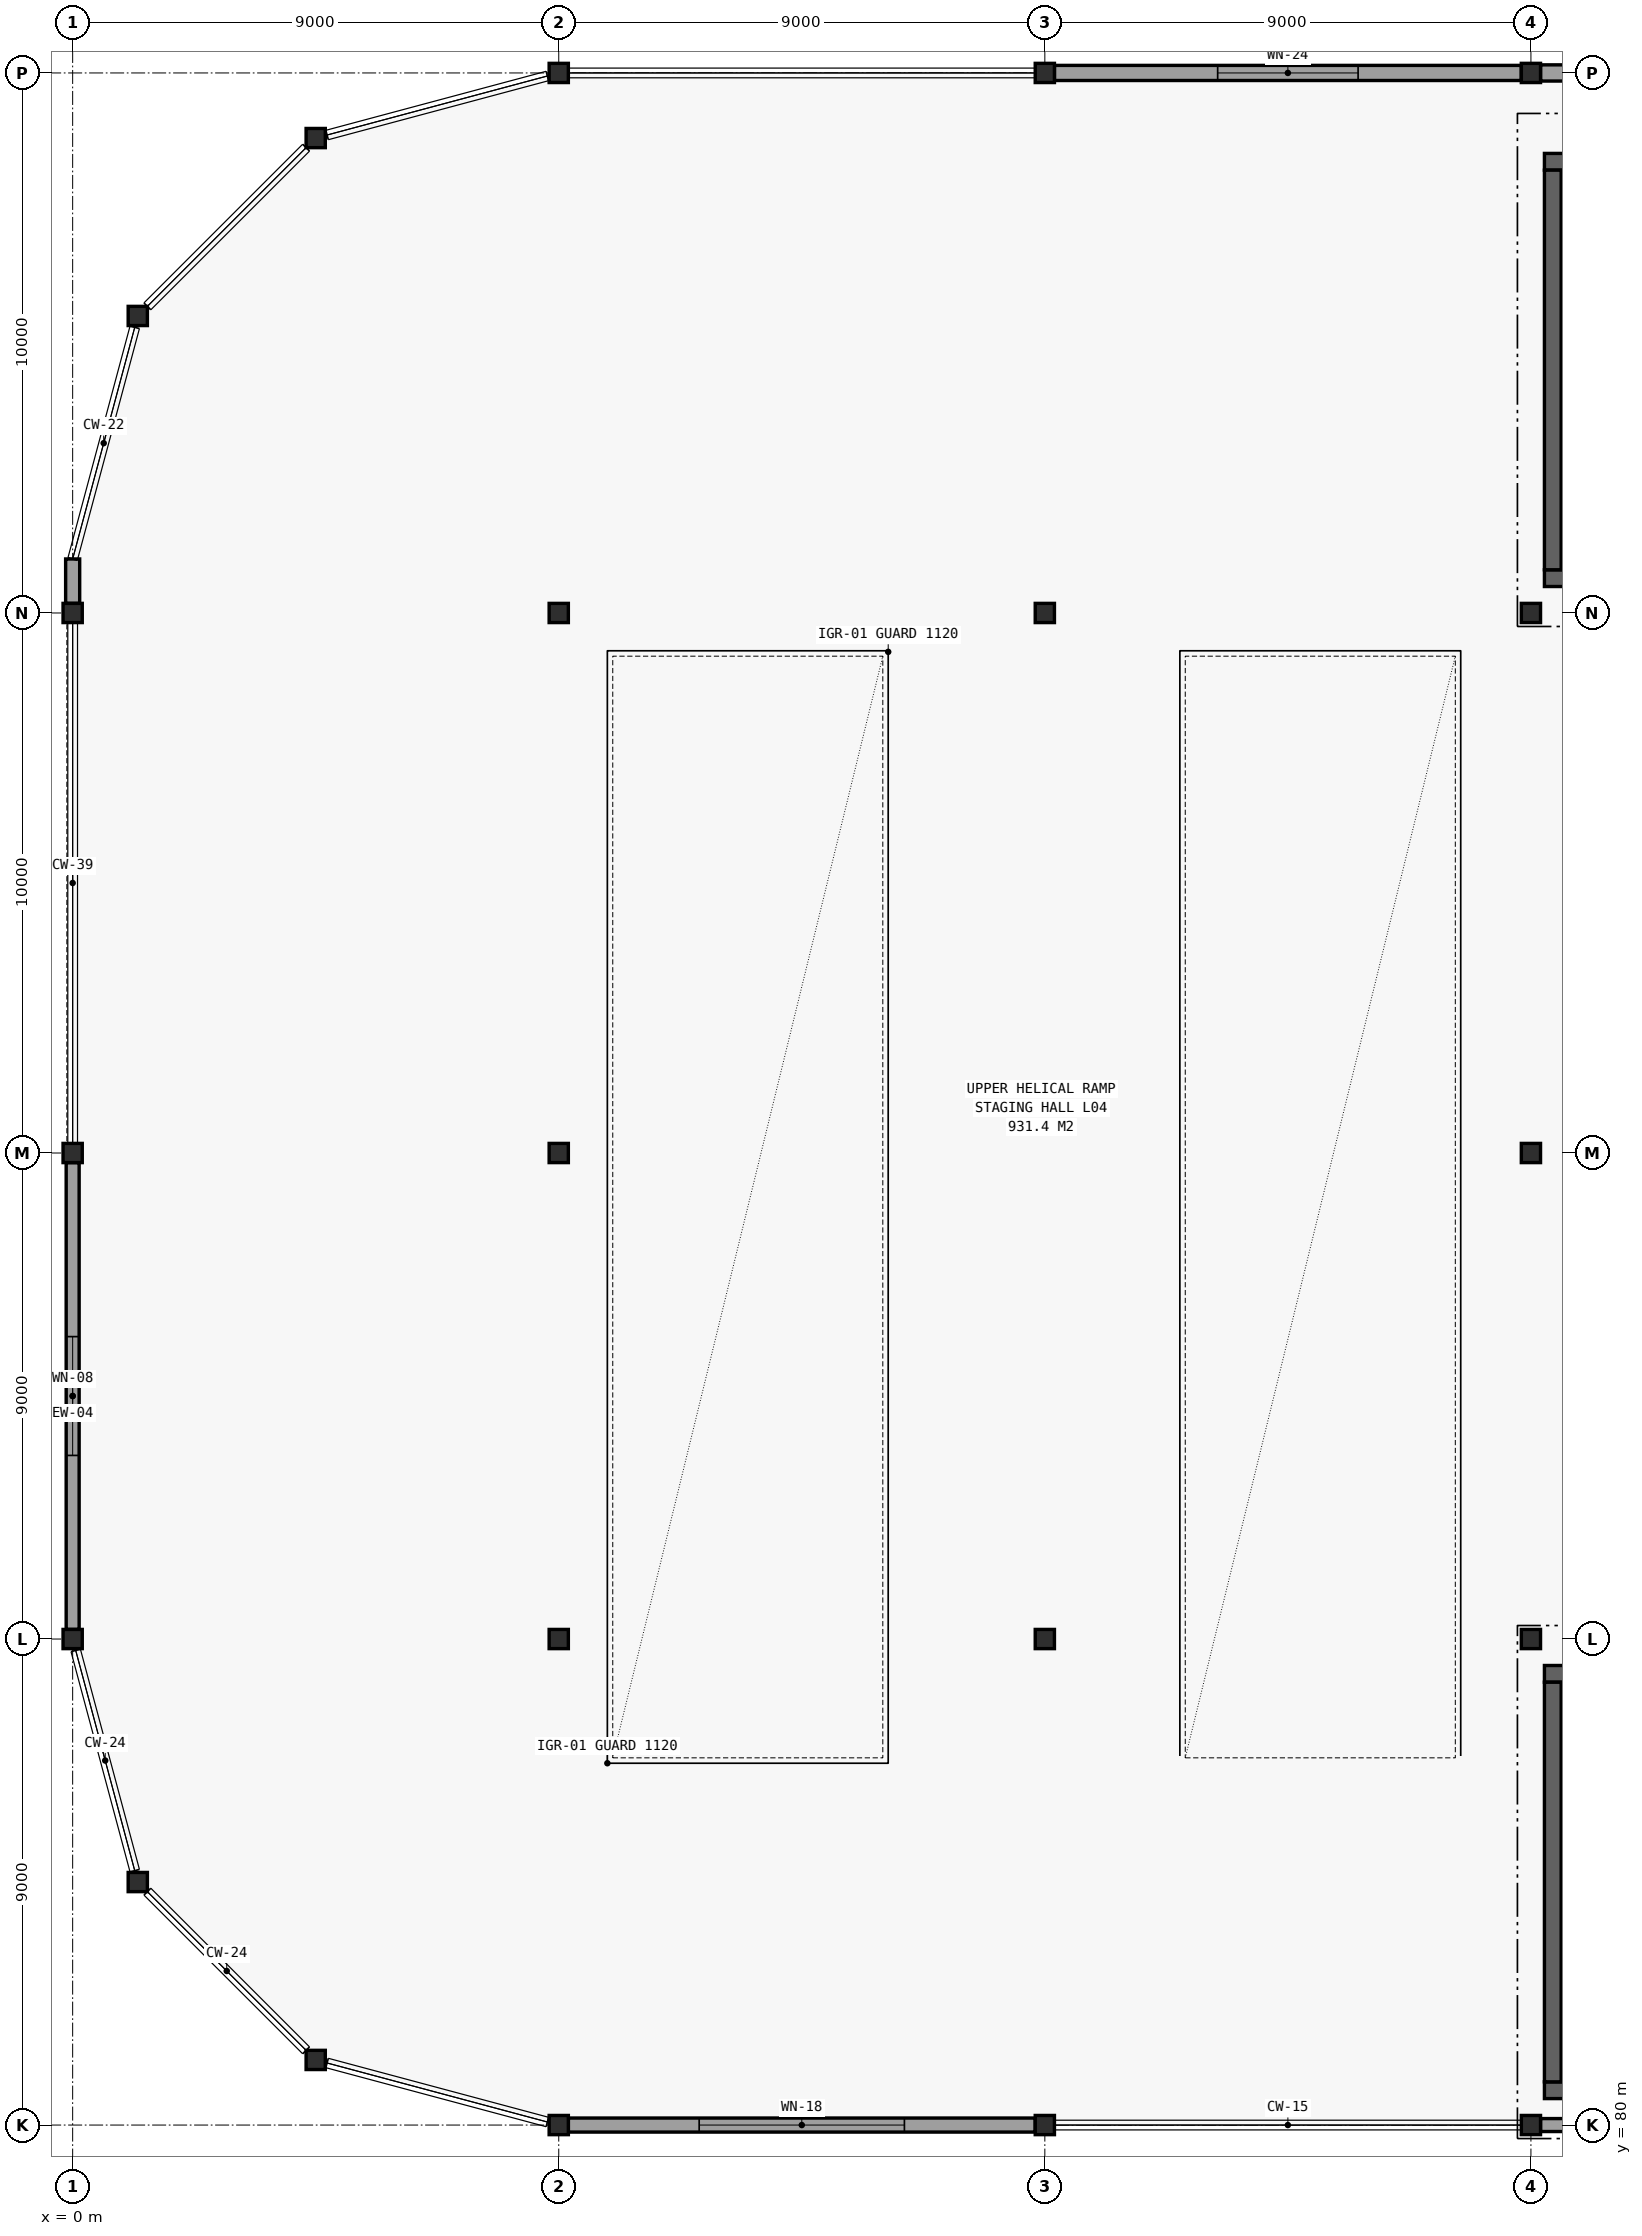
"""IFC4 building model, lengths in metres.
Left out: names, types, materials, properties, quantities, classifications, styles, units other than length and angle.
Written with IfcOpenShell. Run it as: python <this file> out.ifc"""

import sys

from ifc_helpers import new_model, si_unit, direction, frame, frame_2d, origin, origin_2d, place, context, subcontext, project, spatial, rectangle, hollow_circle, extrude, element, fill, save


model = new_model("IFC4")
c1 = context("Model", 3, precision=1e-05, world=origin(), true_north=direction((0.0, 1.0)))
c2 = subcontext(c1, "Body", "Model", "MODEL_VIEW")
j1 = project(units=[si_unit("LENGTHUNIT", "METRE"), si_unit("PLANEANGLEUNIT", "RADIAN")], contexts=[c1])
p1 = place(None, origin())
s1 = spatial("IfcSite", under=j1, at=p1, CompositionType="ELEMENT")
p2 = place(p1, origin())
s2 = spatial("IfcBuilding", under=s1, at=p2, CompositionType="ELEMENT")
p3 = place(p2, frame((0.0, 0.0, 17.7)))
s3 = spatial("IfcBuildingStorey", under=s2, at=p3, CompositionType="ELEMENT", Elevation=17.7)
for number, where, z_axis, x_axis in (
    (1, (0.0, 89.0, 0.0), (0.0, 0.0, 1.0), (1.0, 0.0, 0.0)),
    (2, (0.0, 98.0, 0.0), (0.0, 0.0, 1.0), (1.0, 0.0, 0.0)),
    (3, (0.0, 108.0, 0.0), (0.0, 0.0, 1.0), (1.0, 0.0, 0.0)),
    (4, (1.206, 84.5, 0.0), (0.0, 0.0, 1.0), (1.0, 0.0, 0.0)),
    (5, (1.206, 113.5, 0.0), (0.0, 0.0, 1.0), (1.0, 0.0, 0.0)),
    (6, (4.5, 81.206, 0.0), (0.0, 0.0, 1.0), (1.0, 0.0, 0.0)),
    (7, (4.5, 116.794, 0.0), (0.0, 0.0, 1.0), (1.0, 0.0, 0.0)),
    (8, (9.0, 80.0, 0.0), (0.0, 0.0, 1.0), (1.0, 0.0, 0.0)),
    (9, (9.0, 89.0, 0.0), (0.0, 0.0, 1.0), (1.0, 0.0, 0.0)),
    (10, (9.0, 98.0, 0.0), (0.0, 0.0, 1.0), (1.0, 0.0, 0.0)),
    (11, (9.0, 108.0, 0.0), (0.0, 0.0, 1.0), (1.0, 0.0, 0.0)),
    (12, (9.0, 118.0, 0.0), (0.0, 0.0, 1.0), (1.0, 0.0, 0.0)),
    (13, (18.0, 80.0, 0.0), (0.0, 0.0, 1.0), (1.0, 0.0, 0.0)),
    (14, (18.0, 89.0, 0.0), (0.0, 0.0, 1.0), (1.0, 0.0, 0.0)),
    (15, (18.0, 108.0, 0.0), (0.0, 0.0, 1.0), (1.0, 0.0, 0.0)),
    (16, (18.0, 118.0, 0.0), (0.0, 0.0, 1.0), (1.0, 0.0, 0.0)),
    (17, (27.0, 80.0, 0.0), (0.0, 0.0, 1.0), (1.0, 0.0, 0.0)),
    (18, (27.0, 89.0, 0.0), (0.0, 0.0, 1.0), (1.0, 0.0, 0.0)),
    (19, (27.0, 98.0, 0.0), (0.0, 0.0, 1.0), (1.0, 0.0, 0.0)),
    (20, (27.0, 108.0, 0.0), (0.0, 0.0, 1.0), (1.0, 0.0, 0.0)),
    (21, (27.0, 118.0, 0.0), (0.0, 0.0, 1.0), (1.0, 0.0, 0.0)),
):
    element("IfcColumn", number, at=place(p3, frame(where, z_axis=z_axis, x_axis=x_axis)), inside=s3, PredefinedType="COLUMN", context=c2, shape_type="SweptSolid", body=[
        extrude(hollow_circle(Radius=0.178, WallThickness=0.013, at=origin_2d()), origin(), (0.0, 0.0, 1.0), 4.14),
    ])
p4 = place(p3, frame((9.178, 80.0, 0.0), z_axis=(0.0, 0.0, 1.0), x_axis=(1.0, 0.0, 0.0)))
e22 = element("IfcWall", 22, at=p4, inside=s3, PredefinedType="SOLIDWALL", context=c2, shape_type="SweptSolid", body=[
    extrude(rectangle(XDim=8.645, YDim=0.26, at=frame_2d((4.322, 0.0))), origin(), (0.0, 0.0, 1.0), 3.526),
])
p5 = place(p4, frame((2.422, 0.0, 0.95)))
e23 = element("IfcOpeningElement", 23, at=p5, cuts=e22, PredefinedType="OPENING", context=c2, shape_type="SweptSolid", body=[
    extrude(rectangle(XDim=3.8, YDim=2.1, at=frame_2d((1.9, 1.05))), frame((0.0, 0.141, 0.0), z_axis=(0.0, -1.0, 0.0), x_axis=(1.0, 0.0, 0.0)), (0.0, 0.0, 1.0), 0.282),
])
p6 = place(p3, frame((27.178, 80.0, 0.0), z_axis=(0.0, 0.0, 1.0), x_axis=(1.0, 0.0, 0.0)))
e24 = element("IfcWall", 24, at=p6, inside=s3, PredefinedType="SOLIDWALL", context=c2, shape_type="SweptSolid", body=[
    extrude(rectangle(XDim=8.645, YDim=0.24, at=frame_2d((4.322, 0.0))), origin(), (0.0, 0.0, 1.0), 3.526),
])
p7 = place(p6, frame((2.622, 0.0, 0.95)))
e25 = element("IfcOpeningElement", 25, at=p7, cuts=e24, PredefinedType="OPENING", context=c2, shape_type="SweptSolid", body=[
    extrude(rectangle(XDim=3.4, YDim=2.0, at=frame_2d((1.7, 1.0))), frame((0.0, 0.131, 0.0), z_axis=(0.0, -1.0, 0.0), x_axis=(1.0, 0.0, 0.0)), (0.0, 0.0, 1.0), 0.262),
])
p8 = place(p3, frame((35.822, 118.0, 0.0), z_axis=(0.0, 0.0, 1.0), x_axis=(-1.0, 0.0, 0.0)))
e26 = element("IfcWall", 26, at=p8, inside=s3, PredefinedType="SOLIDWALL", context=c2, shape_type="SweptSolid", body=[
    extrude(rectangle(XDim=8.645, YDim=0.3, at=frame_2d((4.322, 0.0))), origin(), (0.0, 0.0, 1.0), 3.352),
])
p9 = place(p8, frame((2.822, 0.0, 0.95)))
e27 = element("IfcOpeningElement", 27, at=p9, cuts=e26, PredefinedType="OPENING", context=c2, shape_type="SweptSolid", body=[
    extrude(rectangle(XDim=3.0, YDim=2.0, at=frame_2d((1.5, 1.0))), frame((0.0, 0.161, 0.0), z_axis=(0.0, -1.0, 0.0), x_axis=(1.0, 0.0, 0.0)), (0.0, 0.0, 1.0), 0.322),
])
p10 = place(p3, frame((26.822, 118.0, 0.0), z_axis=(0.0, 0.0, 1.0), x_axis=(-1.0, 0.0, 0.0)))
e28 = element("IfcWall", 28, at=p10, inside=s3, PredefinedType="SOLIDWALL", context=c2, shape_type="SweptSolid", body=[
    extrude(rectangle(XDim=8.645, YDim=0.28, at=frame_2d((4.322, 0.0))), origin(), (0.0, 0.0, 1.0), 3.526),
])
p11 = place(p10, frame((3.022, 0.0, 0.95)))
e29 = element("IfcOpeningElement", 29, at=p11, cuts=e28, PredefinedType="OPENING", context=c2, shape_type="SweptSolid", body=[
    extrude(rectangle(XDim=2.6, YDim=1.9, at=frame_2d((1.3, 0.95))), frame((0.0, 0.151, 0.0), z_axis=(0.0, -1.0, 0.0), x_axis=(1.0, 0.0, 0.0)), (0.0, 0.0, 1.0), 0.302),
])
p12 = place(p3, frame((0.0, 109.0, 0.0), z_axis=(0.0, 0.0, 1.0), x_axis=(0.0, -1.0, 0.0)))
e30 = element("IfcWall", 30, at=p12, inside=s3, PredefinedType="SOLIDWALL", context=c2, shape_type="SweptSolid", body=[
    extrude(rectangle(XDim=0.822, YDim=0.26, at=frame_2d((0.411, 0.0))), origin(), (0.0, 0.0, 1.0), 3.526),
])
p13 = place(p3, frame((0.0, 97.822, 0.0), z_axis=(0.0, 0.0, 1.0), x_axis=(0.0, -1.0, 0.0)))
e31 = element("IfcWall", 31, at=p13, inside=s3, PredefinedType="SOLIDWALL", context=c2, shape_type="SweptSolid", body=[
    extrude(rectangle(XDim=8.645, YDim=0.24, at=frame_2d((4.322, 0.0))), origin(), (0.0, 0.0, 1.0), 3.526),
])
p14 = place(p13, frame((3.222, 0.0, 0.95)))
e32 = element("IfcOpeningElement", 32, at=p14, cuts=e31, PredefinedType="OPENING", context=c2, shape_type="SweptSolid", body=[
    extrude(rectangle(XDim=2.2, YDim=1.8, at=frame_2d((1.1, 0.9))), frame((0.0, 0.131, 0.0), z_axis=(0.0, -1.0, 0.0), x_axis=(1.0, 0.0, 0.0)), (0.0, 0.0, 1.0), 0.262),
])
for number, where, z_axis, x_axis in (
    (33, (27.25, 80.645, 0.0), (0.0, 0.0, 1.0), (1.0, 0.0, 0.0)),
    (34, (27.25, 88.355, 0.0), (0.0, 0.0, 1.0), (1.0, 0.0, 0.0)),
):
    element("IfcWall", number, at=place(p3, frame(where, z_axis=z_axis, x_axis=x_axis)), inside=s3, PredefinedType="SHEAR", context=c2, shape_type="SweptSolid", body=[
        extrude(rectangle(XDim=3.9, YDim=0.31, at=frame_2d((1.95, 0.0))), origin(), (0.0, 0.0, 1.0), 3.65),
    ])
p15 = place(p3, frame((27.405, 80.8, 0.0), z_axis=(0.0, 0.0, 1.0), x_axis=(0.0, 1.0, 0.0)))
e35 = element("IfcWall", 35, at=p15, inside=s3, PredefinedType="SHEAR", context=c2, shape_type="SweptSolid", body=[
    extrude(rectangle(XDim=7.4, YDim=0.31, at=frame_2d((3.7, 0.0))), origin(), (0.0, 0.0, 1.0), 3.65),
])
for number, where, z_axis, x_axis in (
    (36, (27.25, 108.645, 0.0), (0.0, 0.0, 1.0), (1.0, 0.0, 0.0)),
    (37, (27.25, 116.355, 0.0), (0.0, 0.0, 1.0), (1.0, 0.0, 0.0)),
):
    element("IfcWall", number, at=place(p3, frame(where, z_axis=z_axis, x_axis=x_axis)), inside=s3, PredefinedType="SHEAR", context=c2, shape_type="SweptSolid", body=[
        extrude(rectangle(XDim=3.9, YDim=0.31, at=frame_2d((1.95, 0.0))), origin(), (0.0, 0.0, 1.0), 3.65),
    ])
p16 = place(p3, frame((27.405, 108.8, 0.0), z_axis=(0.0, 0.0, 1.0), x_axis=(0.0, 1.0, 0.0)))
e38 = element("IfcWall", 38, at=p16, inside=s3, PredefinedType="SHEAR", context=c2, shape_type="SweptSolid", body=[
    extrude(rectangle(XDim=7.4, YDim=0.31, at=frame_2d((3.7, 0.0))), origin(), (0.0, 0.0, 1.0), 3.65),
])
p17 = place(p5, origin())
e39 = element("IfcWindow", 39, at=p17, inside=s3, PartitioningType="SINGLE_PANEL", PredefinedType="WINDOW", context=c2, shape_type="SweptSolid", body=[
    extrude(rectangle(XDim=3.8, YDim=2.1, at=frame_2d((1.9, 1.05))), frame((0.0, 0.03, 0.0), z_axis=(0.0, -1.0, 0.0), x_axis=(1.0, 0.0, 0.0)), (0.0, 0.0, 1.0), 0.06),
])
fill(e23, e39)
p18 = place(p11, origin())
e40 = element("IfcWindow", 40, at=p18, inside=s3, PartitioningType="SINGLE_PANEL", PredefinedType="WINDOW", context=c2, shape_type="SweptSolid", body=[
    extrude(rectangle(XDim=2.6, YDim=1.9, at=frame_2d((1.3, 0.95))), frame((0.0, 0.03, 0.0), z_axis=(0.0, -1.0, 0.0), x_axis=(1.0, 0.0, 0.0)), (0.0, 0.0, 1.0), 0.06),
])
fill(e29, e40)
p19 = place(p14, origin())
e41 = element("IfcWindow", 41, at=p19, inside=s3, PartitioningType="SINGLE_PANEL", PredefinedType="WINDOW", context=c2, shape_type="SweptSolid", body=[
    extrude(rectangle(XDim=2.2, YDim=1.8, at=frame_2d((1.1, 0.9))), frame((0.0, 0.03, 0.0), z_axis=(0.0, -1.0, 0.0), x_axis=(1.0, 0.0, 0.0)), (0.0, 0.0, 1.0), 0.06),
])
fill(e32, e41)
save(model, sys.argv[1])
